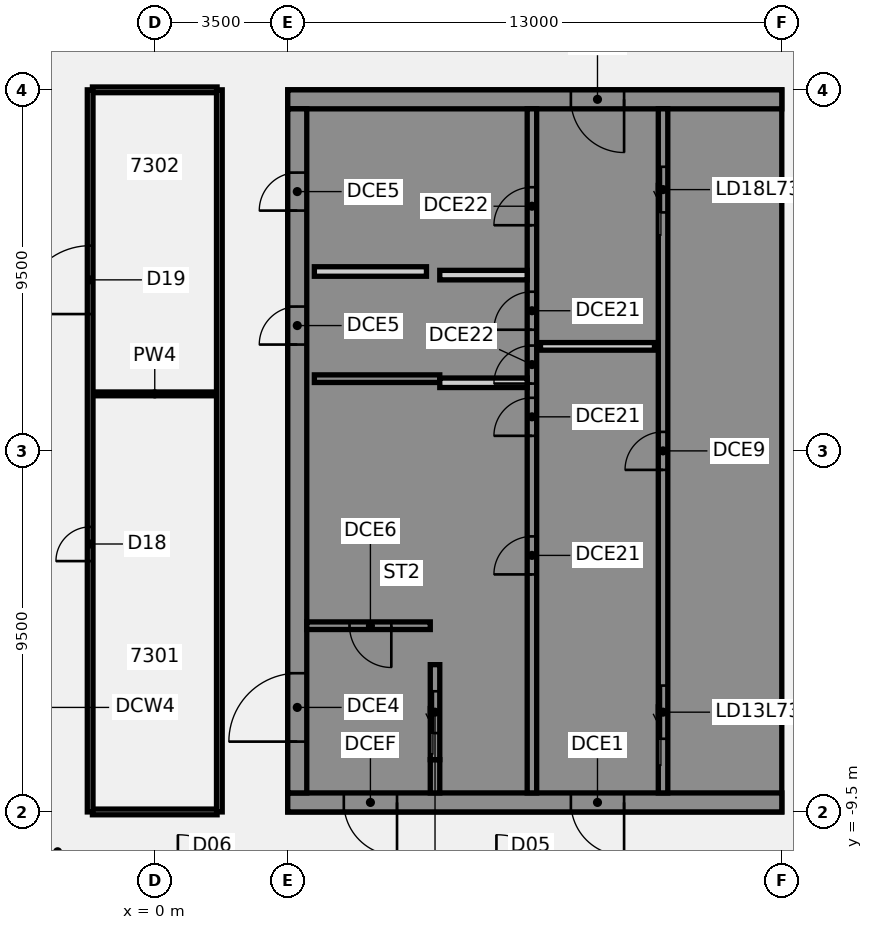
"""IFC4 building model, lengths in metres.
Left out: names, types, materials, properties, quantities, classifications, styles, units other than length and angle.
Written with IfcOpenShell. Run it as: python <this file> out.ifc"""

import sys

from ifc_helpers import new_model, si_unit, direction, frame, frame_2d, origin, place, context, subcontext, project, spatial, polyline, rectangle, outline, extrude, element, fill, save


model = new_model("IFC4")
c1 = context("Model", 3, precision=1e-05, world=origin(), true_north=direction((0.0, 1.0)))
c2 = subcontext(c1, "Body", "Model", "MODEL_VIEW")
j1 = project(units=[si_unit("LENGTHUNIT", "METRE"), si_unit("PLANEANGLEUNIT", "RADIAN")], contexts=[c1])
p1 = place(None, origin())
s1 = spatial("IfcSite", under=j1, at=p1, CompositionType="ELEMENT")
p2 = place(p1, origin())
s2 = spatial("IfcBuilding", under=s1, at=p2, CompositionType="ELEMENT")
p3 = place(p2, frame((0.0, 0.0, 294.4)))
s3 = spatial("IfcBuildingStorey", under=s2, at=p3, CompositionType="ELEMENT", Elevation=294.4)
p4 = place(p3, frame((-1.64, -9.5, 0.0), z_axis=(0.0, 0.0, 1.0), x_axis=(1.0, 0.0, 0.0)))
e1 = element("IfcWall", 1, at=p4, inside=s3, PredefinedType="PARTITIONING", context=c2, shape_type="SweptSolid", body=[
    extrude(rectangle(XDim=3.28, YDim=0.15, at=frame_2d((1.64, 0.0))), origin(), (0.0, 0.0, 1.0), 4.05),
])
p5 = place(p3, frame((-1.64, 1.5, 0.0), z_axis=(0.0, 0.0, 1.0), x_axis=(1.0, 0.0, 0.0)))
e2 = element("IfcWall", 2, at=p5, inside=s3, PredefinedType="PARTITIONING", context=c2, shape_type="SweptSolid", body=[
    extrude(rectangle(XDim=3.28, YDim=0.1, at=frame_2d((1.64, 0.0))), origin(), (0.0, 0.0, 1.0), 4.05),
])
p6 = place(p3, frame((-1.64, 9.5, 0.0), z_axis=(0.0, 0.0, 1.0), x_axis=(1.0, 0.0, 0.0)))
e3 = element("IfcWall", 3, at=p6, inside=s3, PredefinedType="PARTITIONING", context=c2, shape_type="SweptSolid", body=[
    extrude(rectangle(XDim=3.28, YDim=0.15, at=frame_2d((1.64, 0.0))), origin(), (0.0, 0.0, 1.0), 4.05),
])
p7 = place(p3, frame((-1.7, -9.5, 0.0), z_axis=(0.0, 0.0, 1.0), x_axis=(0.0, 1.0, 0.0)))
e4 = element("IfcWall", 4, at=p7, inside=s3, PredefinedType="PARTITIONING", context=c2, shape_type="SweptSolid", body=[
    extrude(rectangle(XDim=19.0, YDim=0.15, at=frame_2d((9.5, 0.0))), origin(), (0.0, 0.0, 1.0), 4.05),
])
p8 = place(p7, frame((6.6, 0.0, 0.0)))
e5 = element("IfcOpeningElement", 5, at=p8, cuts=e4, PredefinedType="OPENING", context=c2, shape_type="SweptSolid", body=[
    extrude(rectangle(XDim=0.9, YDim=2.1, at=frame_2d((0.45, 1.05))), frame((0.0, 0.085, 0.0), z_axis=(0.0, -1.0, 0.0), x_axis=(1.0, 0.0, 0.0)), (0.0, 0.0, 1.0), 0.17),
])
p9 = place(p7, frame((13.1, 0.0, 0.0)))
e6 = element("IfcOpeningElement", 6, at=p9, cuts=e4, PredefinedType="OPENING", context=c2, shape_type="SweptSolid", body=[
    extrude(rectangle(XDim=1.8, YDim=2.1, at=frame_2d((0.9, 1.05))), frame((0.0, 0.085, 0.0), z_axis=(0.0, -1.0, 0.0), x_axis=(1.0, 0.0, 0.0)), (0.0, 0.0, 1.0), 0.17),
])
p10 = place(p3, frame((1.7, -9.5, 0.0), z_axis=(0.0, 0.0, 1.0), x_axis=(0.0, 1.0, 0.0)))
e7 = element("IfcWall", 7, at=p10, inside=s3, PredefinedType="PARTITIONING", context=c2, shape_type="SweptSolid", body=[
    extrude(rectangle(XDim=19.0, YDim=0.15, at=frame_2d((9.5, 0.0))), origin(), (0.0, 0.0, 1.0), 4.05),
])
p11 = place(p3, frame((16.5, -9.25, 0.0), z_axis=(0.0, 0.0, 1.0), x_axis=(-1.0, 0.0, 0.0)))
e8 = element("IfcWall", 8, at=p11, inside=s3, PredefinedType="SHEAR", context=c2, shape_type="SweptSolid", body=[
    extrude(rectangle(XDim=13.0, YDim=0.5, at=frame_2d((6.5, 0.0))), origin(), (0.0, 0.0, 1.0), 4.75),
])
p12 = place(p11, frame((4.15, 0.0, 0.0)))
e9 = element("IfcOpeningElement", 9, at=p12, cuts=e8, PredefinedType="OPENING", context=c2, shape_type="SweptSolid", body=[
    extrude(rectangle(XDim=1.4, YDim=2.1, at=frame_2d((0.7, 1.05))), frame((0.0, 0.26, 0.0), z_axis=(0.0, -1.0, 0.0), x_axis=(1.0, 0.0, 0.0)), (0.0, 0.0, 1.0), 0.52),
])
p13 = place(p11, frame((10.125, 0.0, 0.0)))
e10 = element("IfcOpeningElement", 10, at=p13, cuts=e8, PredefinedType="OPENING", context=c2, shape_type="SweptSolid", body=[
    extrude(rectangle(XDim=1.4, YDim=2.1, at=frame_2d((0.7, 1.05))), frame((0.0, 0.26, 0.0), z_axis=(0.0, -1.0, 0.0), x_axis=(1.0, 0.0, 0.0)), (0.0, 0.0, 1.0), 0.52),
])
p14 = place(p3, frame((16.5, 9.25, 0.0), z_axis=(0.0, 0.0, 1.0), x_axis=(-1.0, 0.0, 0.0)))
e11 = element("IfcWall", 11, at=p14, inside=s3, PredefinedType="SHEAR", context=c2, shape_type="SweptSolid", body=[
    extrude(rectangle(XDim=13.0, YDim=0.5, at=frame_2d((6.5, 0.0))), origin(), (0.0, 0.0, 1.0), 4.75),
])
p15 = place(p14, frame((4.15, 0.0, 0.0)))
e12 = element("IfcOpeningElement", 12, at=p15, cuts=e11, PredefinedType="OPENING", context=c2, shape_type="SweptSolid", body=[
    extrude(rectangle(XDim=1.4, YDim=2.1, at=frame_2d((0.7, 1.05))), frame((0.0, 0.26, 0.0), z_axis=(0.0, -1.0, 0.0), x_axis=(1.0, 0.0, 0.0)), (0.0, 0.0, 1.0), 0.52),
])
p16 = place(p3, frame((13.15, 2.75, 0.0), z_axis=(0.0, 0.0, 1.0), x_axis=(-1.0, 0.0, 0.0)))
e13 = element("IfcWall", 13, at=p16, inside=s3, PredefinedType="PARTITIONING", context=c2, shape_type="SweptSolid", body=[
    extrude(rectangle(XDim=3.0, YDim=0.2, at=frame_2d((1.5, 0.0))), origin(), (0.0, 0.0, 1.0), 4.75),
])
p17 = place(p3, origin())
e14 = element("IfcWall", 14, at=p17, inside=s3, PredefinedType="SHEAR", context=c2, shape_type="SweptSolid", body=[
    extrude(outline(polyline([(13.5, -8.125), (13.5, -9.0), (16.0, -9.0), (16.5, -9.0), (16.5, 9.0), (16.0, 9.0), (13.5, 9.0), (13.5, 8.125), (16.0, 8.125), (16.0, 5.625), (13.5, 5.625), (13.5, 5.375), (16.0, 5.375), (16.0, -5.375), (13.5, -5.375), (13.5, -5.625), (16.0, -5.625), (16.0, -8.125), (13.5, -8.125)])), origin(), (0.0, 0.0, 1.0), 4.75),
])
p18 = place(p3, origin())
e15 = element("IfcWall", 15, at=p18, inside=s3, PredefinedType="SHEAR", context=c2, shape_type="SweptSolid", body=[
    extrude(outline(polyline([(9.8, -5.625), (9.8, -5.375), (7.5, -5.375), (7.5, 8.125), (9.8, 8.125), (9.8, 9.0), (7.5, 9.0), (7.25, 9.0), (7.25, -5.625), (7.5, -5.625), (9.8, -5.625)])), origin(), (0.0, 0.0, 1.0), 4.75),
])
p19 = place(p3, origin())
e16 = element("IfcWall", 16, at=p19, inside=s3, PredefinedType="SHEAR", context=c2, shape_type="SweptSolid", body=[
    extrude(outline(polyline([(7.5, -8.125), (7.5, -9.0), (9.8, -9.0), (9.8, -8.125), (9.8, -5.625), (9.55, -5.625), (9.55, -8.125), (7.5, -8.125)])), origin(), (0.0, 0.0, 1.0), 4.75),
])
p20 = place(p3, frame((7.375, -9.0, 0.0), z_axis=(0.0, 0.0, 1.0), x_axis=(0.0, 1.0, 0.0)))
e17 = element("IfcWall", 17, at=p20, inside=s3, PredefinedType="SHEAR", context=c2, shape_type="SweptSolid", body=[
    extrude(rectangle(XDim=0.875, YDim=0.25, at=frame_2d((0.438, 0.0))), origin(), (0.0, 0.0, 1.0), 4.75),
])
p21 = place(p3, frame((7.5, 1.9, 0.0), z_axis=(0.0, 0.0, 1.0), x_axis=(-1.0, 0.0, 0.0)))
e18 = element("IfcWall", 18, at=p21, inside=s3, PredefinedType="SHEAR", context=c2, shape_type="SweptSolid", body=[
    extrude(rectangle(XDim=3.3, YDim=0.2, at=frame_2d((1.65, 0.0))), origin(), (0.0, 0.0, 1.0), 4.75),
])
p22 = place(p3, frame((13.375, -9.0, 0.0), z_axis=(0.0, 0.0, 1.0), x_axis=(0.0, 1.0, 0.0)))
e19 = element("IfcWall", 19, at=p22, inside=s3, PredefinedType="SHEAR", context=c2, shape_type="SweptSolid", body=[
    extrude(rectangle(XDim=18.0, YDim=0.25, at=frame_2d((9.0, 0.0))), origin(), (0.0, 0.0, 1.0), 4.75),
])
p23 = place(p22, frame((1.425, 0.0, 0.0)))
e20 = element("IfcOpeningElement", 20, at=p23, cuts=e19, PredefinedType="OPENING", context=c2, shape_type="SweptSolid", body=[
    extrude(rectangle(XDim=1.4, YDim=2.1, at=frame_2d((0.7, 1.05))), frame((0.0, 0.135, 0.0), z_axis=(0.0, -1.0, 0.0), x_axis=(1.0, 0.0, 0.0)), (0.0, 0.0, 1.0), 0.27),
])
p24 = place(p22, frame((15.275, 0.0, 0.0)))
e21 = element("IfcOpeningElement", 21, at=p24, cuts=e19, PredefinedType="OPENING", context=c2, shape_type="SweptSolid", body=[
    extrude(rectangle(XDim=1.2, YDim=2.1, at=frame_2d((0.6, 1.05))), frame((0.0, 0.135, 0.0), z_axis=(0.0, -1.0, 0.0), x_axis=(1.0, 0.0, 0.0)), (0.0, 0.0, 1.0), 0.27),
])
p25 = place(p22, frame((8.5, 0.0, 0.0)))
e22 = element("IfcOpeningElement", 22, at=p25, cuts=e19, PredefinedType="OPENING", context=c2, shape_type="SweptSolid", body=[
    extrude(rectangle(XDim=1.0, YDim=2.1, at=frame_2d((0.5, 1.05))), frame((0.0, 0.135, 0.0), z_axis=(0.0, -1.0, 0.0), x_axis=(1.0, 0.0, 0.0)), (0.0, 0.0, 1.0), 0.27),
])
p26 = place(p3, frame((9.925, -9.0, 0.0), z_axis=(0.0, 0.0, 1.0), x_axis=(0.0, 1.0, 0.0)))
e23 = element("IfcWall", 23, at=p26, inside=s3, PredefinedType="SHEAR", context=c2, shape_type="SweptSolid", body=[
    extrude(rectangle(XDim=18.0, YDim=0.25, at=frame_2d((9.0, 0.0))), origin(), (0.0, 0.0, 1.0), 4.75),
])
p27 = place(p26, frame((5.75, 0.0, 0.0)))
e24 = element("IfcOpeningElement", 24, at=p27, cuts=e23, PredefinedType="OPENING", context=c2, shape_type="SweptSolid", body=[
    extrude(rectangle(XDim=1.0, YDim=2.1, at=frame_2d((0.5, 1.05))), frame((0.0, 0.135, 0.0), z_axis=(0.0, -1.0, 0.0), x_axis=(1.0, 0.0, 0.0)), (0.0, 0.0, 1.0), 0.27),
])
p28 = place(p26, frame((9.396, 0.0, 0.0)))
e25 = element("IfcOpeningElement", 25, at=p28, cuts=e23, PredefinedType="OPENING", context=c2, shape_type="SweptSolid", body=[
    extrude(rectangle(XDim=1.0, YDim=2.1, at=frame_2d((0.5, 1.05))), frame((0.0, 0.135, 0.0), z_axis=(0.0, -1.0, 0.0), x_axis=(1.0, 0.0, 0.0)), (0.0, 0.0, 1.0), 0.27),
])
p29 = place(p26, frame((10.771, 0.0, 0.0)))
e26 = element("IfcOpeningElement", 26, at=p29, cuts=e23, PredefinedType="OPENING", context=c2, shape_type="SweptSolid", body=[
    extrude(rectangle(XDim=1.0, YDim=2.1, at=frame_2d((0.5, 1.05))), frame((0.0, 0.135, 0.0), z_axis=(0.0, -1.0, 0.0), x_axis=(1.0, 0.0, 0.0)), (0.0, 0.0, 1.0), 0.27),
])
p30 = place(p26, frame((12.188, 0.0, 0.0)))
e27 = element("IfcOpeningElement", 27, at=p30, cuts=e23, PredefinedType="OPENING", context=c2, shape_type="SweptSolid", body=[
    extrude(rectangle(XDim=1.0, YDim=2.1, at=frame_2d((0.5, 1.05))), frame((0.0, 0.135, 0.0), z_axis=(0.0, -1.0, 0.0), x_axis=(1.0, 0.0, 0.0)), (0.0, 0.0, 1.0), 0.27),
])
p31 = place(p26, frame((14.938, 0.0, 0.0)))
e28 = element("IfcOpeningElement", 28, at=p31, cuts=e23, PredefinedType="OPENING", context=c2, shape_type="SweptSolid", body=[
    extrude(rectangle(XDim=1.0, YDim=2.1, at=frame_2d((0.5, 1.05))), frame((0.0, 0.135, 0.0), z_axis=(0.0, -1.0, 0.0), x_axis=(1.0, 0.0, 0.0)), (0.0, 0.0, 1.0), 0.27),
])
p32 = place(p3, frame((7.375, -8.125, 0.0), z_axis=(0.0, 0.0, 1.0), x_axis=(0.0, 1.0, 0.0)))
e29 = element("IfcWall", 29, at=p32, inside=s3, PredefinedType="SHEAR", context=c2, shape_type="SweptSolid", body=[
    extrude(rectangle(XDim=2.5, YDim=0.25, at=frame_2d((1.25, 0.0))), origin(), (0.0, 0.0, 1.0), 4.75),
])
p33 = place(p32, frame((0.7, 0.0, 0.0)))
e30 = element("IfcOpeningElement", 30, at=p33, cuts=e29, PredefinedType="OPENING", context=c2, shape_type="SweptSolid", body=[
    extrude(rectangle(XDim=1.1, YDim=2.1, at=frame_2d((0.55, 1.05))), frame((0.0, 0.135, 0.0), z_axis=(0.0, -1.0, 0.0), x_axis=(1.0, 0.0, 0.0)), (0.0, 0.0, 1.0), 0.27),
])
p34 = place(p3, frame((3.75, -9.0, 0.0), z_axis=(0.0, 0.0, 1.0), x_axis=(0.0, 1.0, 0.0)))
e31 = element("IfcWall", 31, at=p34, inside=s3, PredefinedType="SHEAR", context=c2, shape_type="SweptSolid", body=[
    extrude(rectangle(XDim=18.0, YDim=0.5, at=frame_2d((9.0, 0.0))), origin(), (0.0, 0.0, 1.0), 4.75),
])
p35 = place(p34, frame((1.35, 0.0, 0.0)))
e32 = element("IfcOpeningElement", 32, at=p35, cuts=e31, PredefinedType="OPENING", context=c2, shape_type="SweptSolid", body=[
    extrude(rectangle(XDim=1.8, YDim=2.1, at=frame_2d((0.9, 1.05))), frame((0.0, 0.26, 0.0), z_axis=(0.0, -1.0, 0.0), x_axis=(1.0, 0.0, 0.0)), (0.0, 0.0, 1.0), 0.52),
])
p36 = place(p34, frame((11.798, 0.0, 0.0)))
e33 = element("IfcOpeningElement", 33, at=p36, cuts=e31, PredefinedType="OPENING", context=c2, shape_type="SweptSolid", body=[
    extrude(rectangle(XDim=1.0, YDim=2.1, at=frame_2d((0.5, 1.05))), frame((0.0, 0.26, 0.0), z_axis=(0.0, -1.0, 0.0), x_axis=(1.0, 0.0, 0.0)), (0.0, 0.0, 1.0), 0.52),
])
p37 = place(p34, frame((15.323, 0.0, 0.0)))
e34 = element("IfcOpeningElement", 34, at=p37, cuts=e31, PredefinedType="OPENING", context=c2, shape_type="SweptSolid", body=[
    extrude(rectangle(XDim=1.0, YDim=2.1, at=frame_2d((0.5, 1.05))), frame((0.0, 0.26, 0.0), z_axis=(0.0, -1.0, 0.0), x_axis=(1.0, 0.0, 0.0)), (0.0, 0.0, 1.0), 0.52),
])
p38 = place(p3, frame((7.15, 4.72, 0.0), z_axis=(0.0, 0.0, 1.0), x_axis=(-1.0, 0.0, 0.0)))
e35 = element("IfcWall", 35, at=p38, inside=s3, PredefinedType="PARTITIONING", context=c2, shape_type="SweptSolid", body=[
    extrude(rectangle(XDim=2.95, YDim=0.25, at=frame_2d((1.475, 0.0))), origin(), (0.0, 0.0, 1.0), 4.75),
])
p39 = place(p3, frame((7.25, -4.6, 0.0), z_axis=(0.0, 0.0, 1.0), x_axis=(-1.0, 0.0, 0.0)))
e36 = element("IfcWall", 36, at=p39, inside=s3, PredefinedType="SHEAR", context=c2, shape_type="SweptSolid", body=[
    extrude(rectangle(XDim=3.25, YDim=0.2, at=frame_2d((1.625, 0.0))), origin(), (0.0, 0.0, 1.0), 4.75),
])
p40 = place(p39, frame((1.025, 0.0, 0.0)))
e37 = element("IfcOpeningElement", 37, at=p40, cuts=e36, PredefinedType="OPENING", context=c2, shape_type="SweptSolid", body=[
    extrude(rectangle(XDim=1.1, YDim=2.1, at=frame_2d((0.55, 1.05))), frame((0.0, 0.11, 0.0), z_axis=(0.0, -1.0, 0.0), x_axis=(1.0, 0.0, 0.0)), (0.0, 0.0, 1.0), 0.22),
])
for number, where, z_axis, x_axis in (
    (38, (9.8, 1.792, 0.0), (0.0, 0.0, 1.0), (-1.0, 0.0, 0.0)),
    (39, (9.8, 4.625, 0.0), (0.0, 0.0, 1.0), (-1.0, 0.0, 0.0)),
):
    element("IfcWall", number, at=place(p3, frame(where, z_axis=z_axis, x_axis=x_axis)), inside=s3, PredefinedType="PARTITIONING", context=c2, shape_type="SweptSolid", body=[
        extrude(rectangle(XDim=2.3, YDim=0.25, at=frame_2d((1.15, 0.0))), origin(), (0.0, 0.0, 1.0), 4.75),
    ])
p41 = place(p8, frame((0.9, 0.0, 0.0), z_axis=(0.0, 0.0, 1.0), x_axis=(-1.0, 0.0, 0.0)))
e40 = element("IfcDoor", 40, at=p41, inside=s3, OperationType="SINGLE_SWING_LEFT", PredefinedType="DOOR", context=c2, shape_type="SweptSolid", body=[
    extrude(rectangle(XDim=0.9, YDim=2.1, at=frame_2d((0.45, 1.05))), frame((0.0, 0.025, 0.0), z_axis=(0.0, -1.0, 0.0), x_axis=(1.0, 0.0, 0.0)), (0.0, 0.0, 1.0), 0.05),
])
fill(e5, e40)
p42 = place(p9, frame((1.8, 0.0, 0.0), z_axis=(0.0, 0.0, 1.0), x_axis=(-1.0, 0.0, 0.0)))
e41 = element("IfcDoor", 41, at=p42, inside=s3, OperationType="DOUBLE_DOOR_SINGLE_SWING", PredefinedType="DOOR", context=c2, shape_type="SweptSolid", body=[
    extrude(rectangle(XDim=1.8, YDim=2.1, at=frame_2d((0.9, 1.05))), frame((0.0, 0.025, 0.0), z_axis=(0.0, -1.0, 0.0), x_axis=(1.0, 0.0, 0.0)), (0.0, 0.0, 1.0), 0.05),
])
fill(e6, e41)
p43 = place(p12, origin())
e42 = element("IfcDoor", 42, at=p43, inside=s3, OperationType="SINGLE_SWING_LEFT", PredefinedType="DOOR", context=c2, shape_type="SweptSolid", body=[
    extrude(rectangle(XDim=1.4, YDim=2.1, at=frame_2d((0.7, 1.05))), frame((0.0, 0.025, 0.0), z_axis=(0.0, -1.0, 0.0), x_axis=(1.0, 0.0, 0.0)), (0.0, 0.0, 1.0), 0.05),
])
fill(e9, e42)
p44 = place(p13, origin())
e43 = element("IfcDoor", 43, at=p44, inside=s3, OperationType="SINGLE_SWING_LEFT", PredefinedType="DOOR", context=c2, shape_type="SweptSolid", body=[
    extrude(rectangle(XDim=1.4, YDim=2.1, at=frame_2d((0.7, 1.05))), frame((0.0, 0.025, 0.0), z_axis=(0.0, -1.0, 0.0), x_axis=(1.0, 0.0, 0.0)), (0.0, 0.0, 1.0), 0.05),
])
fill(e10, e43)
p45 = place(p15, origin())
e44 = element("IfcDoor", 44, at=p45, inside=s3, OperationType="SINGLE_SWING_LEFT", PredefinedType="DOOR", context=c2, shape_type="SweptSolid", body=[
    extrude(rectangle(XDim=1.4, YDim=2.1, at=frame_2d((0.7, 1.05))), frame((0.0, 0.025, 0.0), z_axis=(0.0, -1.0, 0.0), x_axis=(1.0, 0.0, 0.0)), (0.0, 0.0, 1.0), 0.05),
])
fill(e12, e44)
p46 = place(p35, origin())
e45 = element("IfcDoor", 45, at=p46, inside=s3, OperationType="SINGLE_SWING_LEFT", PredefinedType="DOOR", context=c2, shape_type="SweptSolid", body=[
    extrude(rectangle(XDim=1.8, YDim=2.1, at=frame_2d((0.9, 1.05))), frame((0.0, 0.025, 0.0), z_axis=(0.0, -1.0, 0.0), x_axis=(1.0, 0.0, 0.0)), (0.0, 0.0, 1.0), 0.05),
])
fill(e32, e45)
p47 = place(p36, origin())
e46 = element("IfcDoor", 46, at=p47, inside=s3, OperationType="SINGLE_SWING_LEFT", PredefinedType="DOOR", context=c2, shape_type="SweptSolid", body=[
    extrude(rectangle(XDim=1.0, YDim=2.1, at=frame_2d((0.5, 1.05))), frame((0.0, -0.175, 0.0), z_axis=(0.0, -1.0, 0.0), x_axis=(1.0, 0.0, 0.0)), (0.0, 0.0, 1.0), 0.05),
])
fill(e33, e46)
p48 = place(p37, origin())
e47 = element("IfcDoor", 47, at=p48, inside=s3, OperationType="SINGLE_SWING_LEFT", PredefinedType="DOOR", context=c2, shape_type="SweptSolid", body=[
    extrude(rectangle(XDim=1.0, YDim=2.1, at=frame_2d((0.5, 1.05))), frame((0.0, -0.175, 0.0), z_axis=(0.0, -1.0, 0.0), x_axis=(1.0, 0.0, 0.0)), (0.0, 0.0, 1.0), 0.05),
])
fill(e34, e47)
p49 = place(p40, origin())
e48 = element("IfcDoor", 48, at=p49, inside=s3, OperationType="SINGLE_SWING_LEFT", PredefinedType="DOOR", context=c2, shape_type="SweptSolid", body=[
    extrude(rectangle(XDim=1.1, YDim=2.1, at=frame_2d((0.55, 1.05))), frame((0.0, 0.025, 0.0), z_axis=(0.0, -1.0, 0.0), x_axis=(1.0, 0.0, 0.0)), (0.0, 0.0, 1.0), 0.05),
])
fill(e37, e48)
p50 = place(p23, origin())
e49 = element("IfcDoor", 49, at=p50, inside=s3, OperationType="SLIDING_TO_LEFT", PredefinedType="DOOR", context=c2, shape_type="SweptSolid", body=[
    extrude(rectangle(XDim=1.4, YDim=2.1, at=frame_2d((0.7, 1.05))), frame((0.0, 0.025, 0.0), z_axis=(0.0, -1.0, 0.0), x_axis=(1.0, 0.0, 0.0)), (0.0, 0.0, 1.0), 0.05),
])
fill(e20, e49)
p51 = place(p24, origin())
e50 = element("IfcDoor", 50, at=p51, inside=s3, OperationType="SLIDING_TO_LEFT", PredefinedType="DOOR", context=c2, shape_type="SweptSolid", body=[
    extrude(rectangle(XDim=1.2, YDim=2.1, at=frame_2d((0.6, 1.05))), frame((0.0, 0.025, 0.0), z_axis=(0.0, -1.0, 0.0), x_axis=(1.0, 0.0, 0.0)), (0.0, 0.0, 1.0), 0.05),
])
fill(e21, e50)
p52 = place(p33, origin())
e51 = element("IfcDoor", 51, at=p52, inside=s3, OperationType="SLIDING_TO_LEFT", PredefinedType="DOOR", context=c2, shape_type="SweptSolid", body=[
    extrude(rectangle(XDim=1.1, YDim=2.1, at=frame_2d((0.55, 1.05))), frame((0.0, 0.025, 0.0), z_axis=(0.0, -1.0, 0.0), x_axis=(1.0, 0.0, 0.0)), (0.0, 0.0, 1.0), 0.05),
])
fill(e30, e51)
p53 = place(p25, origin())
e52 = element("IfcDoor", 52, at=p53, inside=s3, OperationType="SINGLE_SWING_LEFT", PredefinedType="DOOR", context=c2, shape_type="SweptSolid", body=[
    extrude(rectangle(XDim=1.0, YDim=2.1, at=frame_2d((0.5, 1.05))), frame((0.0, 0.025, 0.0), z_axis=(0.0, -1.0, 0.0), x_axis=(1.0, 0.0, 0.0)), (0.0, 0.0, 1.0), 0.05),
])
fill(e22, e52)
p54 = place(p27, origin())
e53 = element("IfcDoor", 53, at=p54, inside=s3, OperationType="SINGLE_SWING_LEFT", PredefinedType="DOOR", context=c2, shape_type="SweptSolid", body=[
    extrude(rectangle(XDim=1.0, YDim=2.1, at=frame_2d((0.5, 1.05))), frame((0.0, 0.025, 0.0), z_axis=(0.0, -1.0, 0.0), x_axis=(1.0, 0.0, 0.0)), (0.0, 0.0, 1.0), 0.05),
])
fill(e24, e53)
p55 = place(p28, origin())
e54 = element("IfcDoor", 54, at=p55, inside=s3, OperationType="SINGLE_SWING_LEFT", PredefinedType="DOOR", context=c2, shape_type="SweptSolid", body=[
    extrude(rectangle(XDim=1.0, YDim=2.1, at=frame_2d((0.5, 1.05))), frame((0.0, 0.025, 0.0), z_axis=(0.0, -1.0, 0.0), x_axis=(1.0, 0.0, 0.0)), (0.0, 0.0, 1.0), 0.05),
])
fill(e25, e54)
p56 = place(p29, origin())
e55 = element("IfcDoor", 55, at=p56, inside=s3, OperationType="SINGLE_SWING_LEFT", PredefinedType="DOOR", context=c2, shape_type="SweptSolid", body=[
    extrude(rectangle(XDim=1.0, YDim=2.1, at=frame_2d((0.5, 1.05))), frame((0.0, 0.025, 0.0), z_axis=(0.0, -1.0, 0.0), x_axis=(1.0, 0.0, 0.0)), (0.0, 0.0, 1.0), 0.05),
])
fill(e26, e55)
p57 = place(p30, origin())
e56 = element("IfcDoor", 56, at=p57, inside=s3, OperationType="SINGLE_SWING_LEFT", PredefinedType="DOOR", context=c2, shape_type="SweptSolid", body=[
    extrude(rectangle(XDim=1.0, YDim=2.1, at=frame_2d((0.5, 1.05))), frame((0.0, 0.025, 0.0), z_axis=(0.0, -1.0, 0.0), x_axis=(1.0, 0.0, 0.0)), (0.0, 0.0, 1.0), 0.05),
])
fill(e27, e56)
p58 = place(p31, origin())
e57 = element("IfcDoor", 57, at=p58, inside=s3, OperationType="SINGLE_SWING_LEFT", PredefinedType="DOOR", context=c2, shape_type="SweptSolid", body=[
    extrude(rectangle(XDim=1.0, YDim=2.1, at=frame_2d((0.5, 1.05))), frame((0.0, 0.025, 0.0), z_axis=(0.0, -1.0, 0.0), x_axis=(1.0, 0.0, 0.0)), (0.0, 0.0, 1.0), 0.05),
])
fill(e28, e57)
save(model, sys.argv[1])
